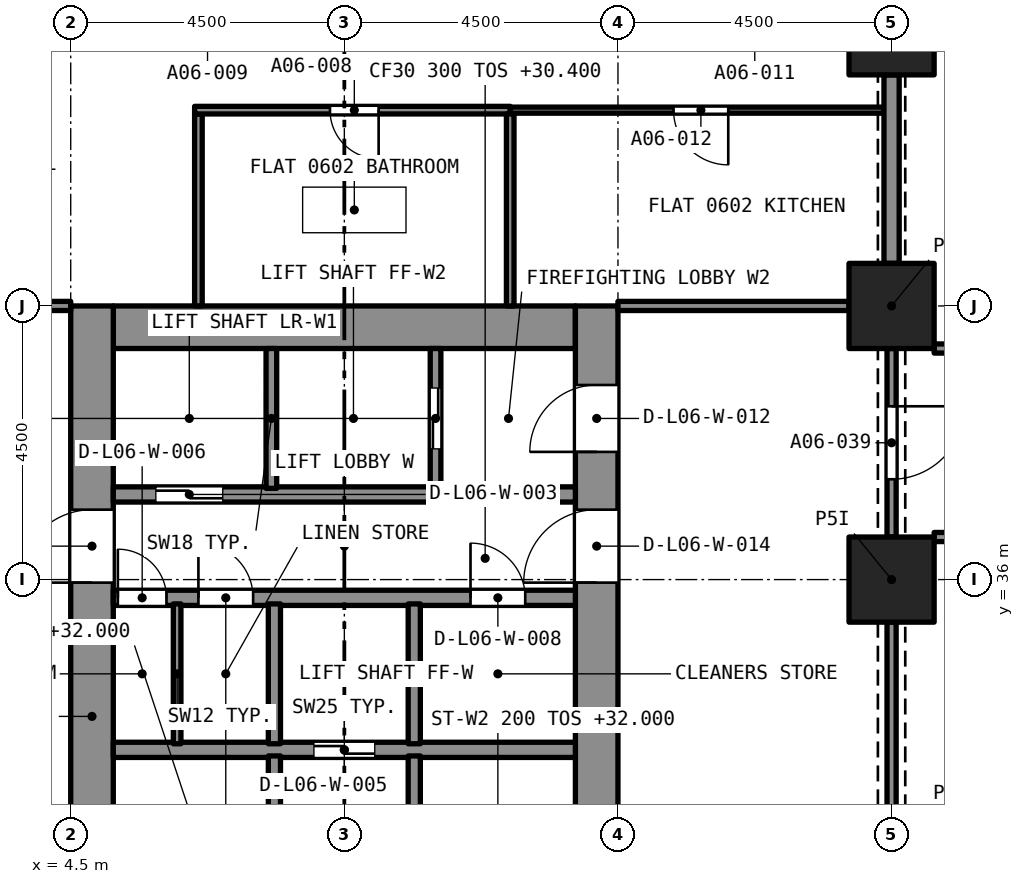
"""IFC4 building model, lengths in metres.
Left out: names, types, materials, properties, quantities, classifications, styles, units other than length and angle.
Written with IfcOpenShell. Run it as: python <this file> out.ifc"""

import sys

from ifc_helpers import new_model, si_unit, direction, frame, frame_2d, origin, origin_2d, place, context, subcontext, project, spatial, rectangle, extrude, element, fill, save


model = new_model("IFC4")
c1 = context("Model", 3, precision=1e-05, world=origin(), true_north=direction((0.0, 1.0)))
c2 = subcontext(c1, "Body", "Model", "MODEL_VIEW")
j1 = project(units=[si_unit("LENGTHUNIT", "METRE"), si_unit("PLANEANGLEUNIT", "RADIAN")], contexts=[c1])
p1 = place(None, origin())
s1 = spatial("IfcSite", under=j1, at=p1, CompositionType="ELEMENT")
p2 = place(p1, origin())
s2 = spatial("IfcBuilding", under=s1, at=p2, CompositionType="ELEMENT")
p3 = place(p2, frame((0.0, 0.0, 30.4)))
s3 = spatial("IfcBuildingStorey", under=s2, at=p3, CompositionType="ELEMENT", Elevation=30.4)
for number, where, z_axis, x_axis in (
    (1, (18.0, 36.0, 0.0), (0.0, 0.0, 1.0), (1.0, 0.0, 0.0)),
    (2, (18.0, 40.5, 0.0), (0.0, 0.0, 1.0), (1.0, 0.0, 0.0)),
    (3, (18.0, 45.0, 0.0), (0.0, 0.0, 1.0), (1.0, 0.0, 0.0)),
):
    element("IfcColumn", number, at=place(p3, frame(where, z_axis=z_axis, x_axis=x_axis)), inside=s3, PredefinedType="COLUMN", context=c2, shape_type="SweptSolid", body=[
        extrude(rectangle(XDim=1.4, YDim=1.4, at=origin_2d()), origin(), (0.0, 0.0, 1.0), 3.2),
    ])
p4 = place(p3, frame((5.2, 40.15, 0.0), z_axis=(0.0, 0.0, 1.0), x_axis=(1.0, 0.0, 0.0)))
e4 = element("IfcWall", 4, at=p4, inside=s3, PredefinedType="SOLIDWALL", context=c2, shape_type="SweptSolid", body=[
    extrude(rectangle(XDim=7.6, YDim=0.7, at=frame_2d((3.8, 0.0))), origin(), (0.0, 0.0, 1.0), 3.2),
])
p5 = place(p3, frame((4.85, 27.0, 0.0), z_axis=(0.0, 0.0, 1.0), x_axis=(0.0, 1.0, 0.0)))
e5 = element("IfcWall", 5, at=p5, inside=s3, PredefinedType="SOLIDWALL", context=c2, shape_type="SweptSolid", body=[
    extrude(rectangle(XDim=13.5, YDim=0.7, at=frame_2d((6.75, 0.0))), origin(), (0.0, 0.0, 1.0), 3.2),
])
p6 = place(p5, frame((8.95, 0.0, 0.0)))
e6 = element("IfcOpeningElement", 6, at=p6, cuts=e5, PredefinedType="OPENING", context=c2, shape_type="SweptSolid", body=[
    extrude(rectangle(XDim=1.2, YDim=2.1, at=frame_2d((0.6, 1.05))), frame((0.0, 0.36, 0.0), z_axis=(0.0, -1.0, 0.0), x_axis=(1.0, 0.0, 0.0)), (0.0, 0.0, 1.0), 0.72),
])
p7 = place(p3, frame((13.15, 27.0, 0.0), z_axis=(0.0, 0.0, 1.0), x_axis=(0.0, 1.0, 0.0)))
e7 = element("IfcWall", 7, at=p7, inside=s3, PredefinedType="SOLIDWALL", context=c2, shape_type="SweptSolid", body=[
    extrude(rectangle(XDim=13.5, YDim=0.7, at=frame_2d((6.75, 0.0))), origin(), (0.0, 0.0, 1.0), 3.2),
])
p8 = place(p7, frame((11.1, 0.0, 0.0)))
e8 = element("IfcOpeningElement", 8, at=p8, cuts=e7, PredefinedType="OPENING", context=c2, shape_type="SweptSolid", body=[
    extrude(rectangle(XDim=1.1, YDim=2.1, at=frame_2d((0.55, 1.05))), frame((0.0, 0.36, 0.0), z_axis=(0.0, -1.0, 0.0), x_axis=(1.0, 0.0, 0.0)), (0.0, 0.0, 1.0), 0.72),
])
p9 = place(p7, frame((8.95, 0.0, 0.0)))
e9 = element("IfcOpeningElement", 9, at=p9, cuts=e7, PredefinedType="OPENING", context=c2, shape_type="SweptSolid", body=[
    extrude(rectangle(XDim=1.2, YDim=2.1, at=frame_2d((0.6, 1.05))), frame((0.0, 0.36, 0.0), z_axis=(0.0, -1.0, 0.0), x_axis=(1.0, 0.0, 0.0)), (0.0, 0.0, 1.0), 0.72),
])
p10 = place(p3, frame((6.6, 40.5, 0.0), z_axis=(0.0, 0.0, 1.0), x_axis=(0.0, 1.0, 0.0)))
e10 = element("IfcWall", 10, at=p10, inside=s3, PredefinedType="PARTITIONING", context=c2, shape_type="SweptSolid", body=[
    extrude(rectangle(XDim=3.157, YDim=0.125, at=frame_2d((1.579, 0.0))), origin(), (0.0, 0.0, 1.0), 2.9),
])
p11 = place(p3, frame((11.728, 43.72, 0.0), z_axis=(0.0, 0.0, 1.0), x_axis=(-1.0, 0.0, 0.0)))
e11 = element("IfcWall", 11, at=p11, inside=s3, PredefinedType="PARTITIONING", context=c2, shape_type="SweptSolid", body=[
    extrude(rectangle(XDim=5.19, YDim=0.125, at=frame_2d((2.595, 0.0))), origin(), (0.0, 0.0, 1.0), 2.9),
])
p12 = place(p11, frame((2.164, 0.0, 0.0)))
e12 = element("IfcOpeningElement", 12, at=p12, cuts=e11, PredefinedType="OPENING", context=c2, shape_type="SweptSolid", body=[
    extrude(rectangle(XDim=0.8, YDim=2.1, at=frame_2d((0.4, 1.05))), frame((0.0, 0.073, 0.0), z_axis=(0.0, -1.0, 0.0), x_axis=(1.0, 0.0, 0.0)), (0.0, 0.0, 1.0), 0.145),
])
p13 = place(p3, frame((11.728, 40.5, 0.0), z_axis=(0.0, 0.0, 1.0), x_axis=(0.0, 1.0, 0.0)))
e13 = element("IfcWall", 13, at=p13, inside=s3, PredefinedType="PARTITIONING", context=c2, shape_type="SweptSolid", body=[
    extrude(rectangle(XDim=3.157, YDim=0.125, at=frame_2d((1.579, 0.0))), origin(), (0.0, 0.0, 1.0), 2.9),
])
p14 = place(p3, frame((17.875, 43.72, 0.0), z_axis=(0.0, 0.0, 1.0), x_axis=(-1.0, 0.0, 0.0)))
e14 = element("IfcWall", 14, at=p14, inside=s3, PredefinedType="PARTITIONING", context=c2, shape_type="SweptSolid", body=[
    extrude(rectangle(XDim=6.147, YDim=0.1, at=frame_2d((3.073, 0.0))), origin(), (0.0, 0.0, 1.0), 2.9),
])
p15 = place(p14, frame((2.561, 0.0, 0.0)))
e15 = element("IfcOpeningElement", 15, at=p15, cuts=e14, PredefinedType="OPENING", context=c2, shape_type="SweptSolid", body=[
    extrude(rectangle(XDim=0.9, YDim=2.1, at=frame_2d((0.45, 1.05))), frame((0.0, 0.06, 0.0), z_axis=(0.0, -1.0, 0.0), x_axis=(1.0, 0.0, 0.0)), (0.0, 0.0, 1.0), 0.12),
])
p16 = place(p3, frame((0.7, 40.5, 0.0), z_axis=(0.0, 0.0, 1.0), x_axis=(1.0, 0.0, 0.0)))
e16 = element("IfcWall", 16, at=p16, inside=s3, PredefinedType="PARTITIONING", context=c2, shape_type="SweptSolid", body=[
    extrude(rectangle(XDim=3.8, YDim=0.15, at=frame_2d((1.9, 0.0))), origin(), (0.0, 0.0, 1.0), 2.9),
])
p17 = place(p16, frame((1.05, 0.0, 0.0)))
e17 = element("IfcOpeningElement", 17, at=p17, cuts=e16, PredefinedType="OPENING", context=c2, shape_type="SweptSolid", body=[
    extrude(rectangle(XDim=1.0, YDim=2.1, at=frame_2d((0.5, 1.05))), frame((0.0, 0.085, 0.0), z_axis=(0.0, -1.0, 0.0), x_axis=(1.0, 0.0, 0.0)), (0.0, 0.0, 1.0), 0.17),
])
p18 = place(p3, frame((18.0, 41.2, 0.0), z_axis=(0.0, 0.0, 1.0), x_axis=(0.0, 1.0, 0.0)))
e18 = element("IfcWall", 18, at=p18, inside=s3, PredefinedType="PARTITIONING", context=c2, shape_type="SweptSolid", body=[
    extrude(rectangle(XDim=3.1, YDim=0.25, at=frame_2d((1.55, 0.0))), origin(), (0.0, 0.0, 1.0), 2.38),
])
p19 = place(p3, frame((13.5, 40.5, 0.0), z_axis=(0.0, 0.0, 1.0), x_axis=(1.0, 0.0, 0.0)))
e19 = element("IfcWall", 19, at=p19, inside=s3, PredefinedType="PARTITIONING", context=c2, shape_type="SweptSolid", body=[
    extrude(rectangle(XDim=3.8, YDim=0.15, at=frame_2d((1.9, 0.0))), origin(), (0.0, 0.0, 1.0), 2.9),
])
p20 = place(p3, frame((18.7, 39.8, 0.0), z_axis=(0.0, 0.0, 1.0), x_axis=(1.0, 0.0, 0.0)))
e20 = element("IfcWall", 20, at=p20, inside=s3, PredefinedType="PARTITIONING", context=c2, shape_type="SweptSolid", body=[
    extrude(rectangle(XDim=12.1, YDim=0.15, at=frame_2d((6.05, 0.0))), origin(), (0.0, 0.0, 1.0), 2.75),
])
p21 = place(p20, frame((5.55, 0.0, 0.0)))
e21 = element("IfcOpeningElement", 21, at=p21, cuts=e20, PredefinedType="OPENING", context=c2, shape_type="SweptSolid", body=[
    extrude(rectangle(XDim=1.0, YDim=2.1, at=frame_2d((0.5, 1.05))), frame((0.0, 0.085, 0.0), z_axis=(0.0, -1.0, 0.0), x_axis=(1.0, 0.0, 0.0)), (0.0, 0.0, 1.0), 0.17),
])
p22 = place(p3, frame((24.75, 36.7, 0.0), z_axis=(0.0, 0.0, 1.0), x_axis=(-1.0, 0.0, 0.0)))
e22 = element("IfcWall", 22, at=p22, inside=s3, PredefinedType="PARTITIONING", context=c2, shape_type="SweptSolid", body=[
    extrude(rectangle(XDim=6.05, YDim=0.15, at=frame_2d((3.025, 0.0))), origin(), (0.0, 0.0, 1.0), 2.75),
])
p23 = place(p22, frame((2.875, 0.0, 0.0)))
e23 = element("IfcOpeningElement", 23, at=p23, cuts=e22, PredefinedType="OPENING", context=c2, shape_type="SweptSolid", body=[
    extrude(rectangle(XDim=1.0, YDim=2.1, at=frame_2d((0.5, 1.05))), frame((0.0, 0.085, 0.0), z_axis=(0.0, -1.0, 0.0), x_axis=(1.0, 0.0, 0.0)), (0.0, 0.0, 1.0), 0.17),
])
p24 = place(p3, frame((18.0, 39.8, 0.0), z_axis=(0.0, 0.0, 1.0), x_axis=(0.0, -1.0, 0.0)))
e24 = element("IfcWall", 24, at=p24, inside=s3, PredefinedType="PARTITIONING", context=c2, shape_type="SweptSolid", body=[
    extrude(rectangle(XDim=3.1, YDim=0.15, at=frame_2d((1.55, 0.0))), origin(), (0.0, 0.0, 1.0), 2.38),
])
p25 = place(p24, frame((0.95, 0.0, 0.0)))
e25 = element("IfcOpeningElement", 25, at=p25, cuts=e24, PredefinedType="OPENING", context=c2, shape_type="SweptSolid", body=[
    extrude(rectangle(XDim=1.2, YDim=2.1, at=frame_2d((0.6, 1.05))), frame((0.0, 0.085, 0.0), z_axis=(0.0, -1.0, 0.0), x_axis=(1.0, 0.0, 0.0)), (0.0, 0.0, 1.0), 0.17),
])
p26 = place(p3, frame((18.0, 32.2, 0.0), z_axis=(0.0, 0.0, 1.0), x_axis=(0.0, 1.0, 0.0)))
e26 = element("IfcWall", 26, at=p26, inside=s3, PredefinedType="PARTITIONING", context=c2, shape_type="SweptSolid", body=[
    extrude(rectangle(XDim=3.1, YDim=0.15, at=frame_2d((1.55, 0.0))), origin(), (0.0, 0.0, 1.0), 2.38),
])
p27 = place(p3, frame((5.2, 33.2, 0.0), z_axis=(0.0, 0.0, 1.0), x_axis=(1.0, 0.0, 0.0)))
e27 = element("IfcWall", 27, at=p27, inside=s3, PredefinedType="SOLIDWALL", context=c2, shape_type="SweptSolid", body=[
    extrude(rectangle(XDim=7.6, YDim=0.25, at=frame_2d((3.8, 0.0))), origin(), (0.0, 0.0, 1.0), 2.9),
])
p28 = place(p27, frame((3.3, 0.0, 0.0)))
e28 = element("IfcOpeningElement", 28, at=p28, cuts=e27, PredefinedType="OPENING", context=c2, shape_type="SweptSolid", body=[
    extrude(rectangle(XDim=1.0, YDim=2.1, at=frame_2d((0.5, 1.05))), frame((0.0, 0.135, 0.0), z_axis=(0.0, -1.0, 0.0), x_axis=(1.0, 0.0, 0.0)), (0.0, 0.0, 1.0), 0.27),
])
p29 = place(p3, frame((5.2, 35.7, 0.0), z_axis=(0.0, 0.0, 1.0), x_axis=(1.0, 0.0, 0.0)))
e29 = element("IfcWall", 29, at=p29, inside=s3, PredefinedType="SOLIDWALL", context=c2, shape_type="SweptSolid", body=[
    extrude(rectangle(XDim=7.6, YDim=0.25, at=frame_2d((3.8, 0.0))), origin(), (0.0, 0.0, 1.0), 2.9),
])
p30 = place(p29, frame((0.075, 0.0, 0.0)))
e30 = element("IfcOpeningElement", 30, at=p30, cuts=e29, PredefinedType="OPENING", context=c2, shape_type="SweptSolid", body=[
    extrude(rectangle(XDim=0.8, YDim=2.1, at=frame_2d((0.4, 1.05))), frame((0.0, 0.135, 0.0), z_axis=(0.0, -1.0, 0.0), x_axis=(1.0, 0.0, 0.0)), (0.0, 0.0, 1.0), 0.27),
])
p31 = place(p29, frame((1.4, 0.0, 0.0)))
e31 = element("IfcOpeningElement", 31, at=p31, cuts=e29, PredefinedType="OPENING", context=c2, shape_type="SweptSolid", body=[
    extrude(rectangle(XDim=0.9, YDim=2.1, at=frame_2d((0.45, 1.05))), frame((0.0, 0.135, 0.0), z_axis=(0.0, -1.0, 0.0), x_axis=(1.0, 0.0, 0.0)), (0.0, 0.0, 1.0), 0.27),
])
p32 = place(p29, frame((5.875, 0.0, 0.0)))
e32 = element("IfcOpeningElement", 32, at=p32, cuts=e29, PredefinedType="OPENING", context=c2, shape_type="SweptSolid", body=[
    extrude(rectangle(XDim=0.9, YDim=2.1, at=frame_2d((0.45, 1.05))), frame((0.0, 0.135, 0.0), z_axis=(0.0, -1.0, 0.0), x_axis=(1.0, 0.0, 0.0)), (0.0, 0.0, 1.0), 0.27),
])
p33 = place(p3, frame((5.2, 37.4, 0.0), z_axis=(0.0, 0.0, 1.0), x_axis=(1.0, 0.0, 0.0)))
e33 = element("IfcWall", 33, at=p33, inside=s3, PredefinedType="SOLIDWALL", context=c2, shape_type="SweptSolid", body=[
    extrude(rectangle(XDim=7.6, YDim=0.25, at=frame_2d((3.8, 0.0))), origin(), (0.0, 0.0, 1.0), 2.9),
])
p34 = place(p33, frame((0.7, 0.0, 0.0)))
e34 = element("IfcOpeningElement", 34, at=p34, cuts=e33, PredefinedType="OPENING", context=c2, shape_type="SweptSolid", body=[
    extrude(rectangle(XDim=1.1, YDim=2.4, at=frame_2d((0.55, 1.2))), frame((0.0, 0.135, 0.0), z_axis=(0.0, -1.0, 0.0), x_axis=(1.0, 0.0, 0.0)), (0.0, 0.0, 1.0), 0.27),
])
p35 = place(p3, frame((7.85, 27.7, 0.0), z_axis=(0.0, 0.0, 1.0), x_axis=(0.0, 1.0, 0.0)))
e35 = element("IfcWall", 35, at=p35, inside=s3, PredefinedType="SOLIDWALL", context=c2, shape_type="SweptSolid", body=[
    extrude(rectangle(XDim=5.4, YDim=0.2, at=frame_2d((2.7, 0.0))), origin(), (0.0, 0.0, 1.0), 2.9),
])
p36 = place(p35, frame((0.2, 0.0, 0.0)))
e36 = element("IfcOpeningElement", 36, at=p36, cuts=e35, PredefinedType="OPENING", context=c2, shape_type="SweptSolid", body=[
    extrude(rectangle(XDim=0.9, YDim=2.1, at=frame_2d((0.45, 1.05))), frame((0.0, 0.11, 0.0), z_axis=(0.0, -1.0, 0.0), x_axis=(1.0, 0.0, 0.0)), (0.0, 0.0, 1.0), 0.22),
])
p37 = place(p3, frame((10.15, 27.7, 0.0), z_axis=(0.0, 0.0, 1.0), x_axis=(0.0, 1.0, 0.0)))
e37 = element("IfcWall", 37, at=p37, inside=s3, PredefinedType="SOLIDWALL", context=c2, shape_type="SweptSolid", body=[
    extrude(rectangle(XDim=5.4, YDim=0.2, at=frame_2d((2.7, 0.0))), origin(), (0.0, 0.0, 1.0), 2.9),
])
p38 = place(p37, frame((0.2, 0.0, 0.0)))
e38 = element("IfcOpeningElement", 38, at=p38, cuts=e37, PredefinedType="OPENING", context=c2, shape_type="SweptSolid", body=[
    extrude(rectangle(XDim=0.9, YDim=2.1, at=frame_2d((0.45, 1.05))), frame((0.0, 0.11, 0.0), z_axis=(0.0, -1.0, 0.0), x_axis=(1.0, 0.0, 0.0)), (0.0, 0.0, 1.0), 0.22),
])
for number, where, z_axis, x_axis in (
    (39, (7.85, 33.3, 0.0), (0.0, 0.0, 1.0), (0.0, 1.0, 0.0)),
    (40, (10.15, 33.3, 0.0), (0.0, 0.0, 1.0), (0.0, 1.0, 0.0)),
):
    element("IfcWall", number, at=place(p3, frame(where, z_axis=z_axis, x_axis=x_axis)), inside=s3, PredefinedType="SOLIDWALL", context=c2, shape_type="SweptSolid", body=[
        extrude(rectangle(XDim=2.3, YDim=0.2, at=frame_2d((1.15, 0.0))), origin(), (0.0, 0.0, 1.0), 2.9),
    ])
p39 = place(p3, frame((7.8, 37.5, 0.0), z_axis=(0.0, 0.0, 1.0), x_axis=(0.0, 1.0, 0.0)))
e41 = element("IfcWall", 41, at=p39, inside=s3, PredefinedType="SOLIDWALL", context=c2, shape_type="SweptSolid", body=[
    extrude(rectangle(XDim=2.3, YDim=0.175, at=frame_2d((1.15, 0.0))), origin(), (0.0, 0.0, 1.0), 2.9),
])
p40 = place(p3, frame((10.5, 37.5, 0.0), z_axis=(0.0, 0.0, 1.0), x_axis=(0.0, 1.0, 0.0)))
e42 = element("IfcWall", 42, at=p40, inside=s3, PredefinedType="SOLIDWALL", context=c2, shape_type="SweptSolid", body=[
    extrude(rectangle(XDim=2.3, YDim=0.175, at=frame_2d((1.15, 0.0))), origin(), (0.0, 0.0, 1.0), 2.9),
])
p41 = place(p40, frame((0.65, 0.0, 0.0)))
e43 = element("IfcOpeningElement", 43, at=p41, cuts=e42, PredefinedType="OPENING", context=c2, shape_type="SweptSolid", body=[
    extrude(rectangle(XDim=1.0, YDim=2.1, at=frame_2d((0.5, 1.05))), frame((0.0, 0.097, 0.0), z_axis=(0.0, -1.0, 0.0), x_axis=(1.0, 0.0, 0.0)), (0.0, 0.0, 1.0), 0.195),
])
p42 = place(p3, frame((6.25, 33.3, 0.0), z_axis=(0.0, 0.0, 1.0), x_axis=(0.0, 1.0, 0.0)))
e44 = element("IfcWall", 44, at=p42, inside=s3, PredefinedType="PARTITIONING", context=c2, shape_type="SweptSolid", body=[
    extrude(rectangle(XDim=2.3, YDim=0.125, at=frame_2d((1.15, 0.0))), origin(), (0.0, 0.0, 1.0), 2.9),
])
p43 = place(p12, origin())
e45 = element("IfcDoor", 45, at=p43, inside=s3, OperationType="SINGLE_SWING_LEFT", PredefinedType="DOOR", context=c2, shape_type="SweptSolid", body=[
    extrude(rectangle(XDim=0.8, YDim=2.1, at=frame_2d((0.4, 1.05))), frame((0.0, 0.025, 0.0), z_axis=(0.0, -1.0, 0.0), x_axis=(1.0, 0.0, 0.0)), (0.0, 0.0, 1.0), 0.05),
])
fill(e12, e45)
p44 = place(p15, origin())
e46 = element("IfcDoor", 46, at=p44, inside=s3, OperationType="SINGLE_SWING_LEFT", PredefinedType="DOOR", context=c2, shape_type="SweptSolid", body=[
    extrude(rectangle(XDim=0.9, YDim=2.1, at=frame_2d((0.45, 1.05))), frame((0.0, 0.025, 0.0), z_axis=(0.0, -1.0, 0.0), x_axis=(1.0, 0.0, 0.0)), (0.0, 0.0, 1.0), 0.05),
])
fill(e15, e46)
p45 = place(p25, origin())
e47 = element("IfcDoor", 47, at=p45, inside=s3, OperationType="SINGLE_SWING_LEFT", PredefinedType="DOOR", context=c2, shape_type="SweptSolid", body=[
    extrude(rectangle(XDim=1.2, YDim=2.1, at=frame_2d((0.6, 1.05))), frame((0.0, 0.025, 0.0), z_axis=(0.0, -1.0, 0.0), x_axis=(1.0, 0.0, 0.0)), (0.0, 0.0, 1.0), 0.05),
])
fill(e25, e47)
p46 = place(p34, origin())
e48 = element("IfcDoor", 48, at=p46, inside=s3, OperationType="SLIDING_TO_LEFT", PredefinedType="DOOR", context=c2, shape_type="SweptSolid", body=[
    extrude(rectangle(XDim=1.1, YDim=2.4, at=frame_2d((0.55, 1.2))), frame((0.0, 0.025, 0.0), z_axis=(0.0, -1.0, 0.0), x_axis=(1.0, 0.0, 0.0)), (0.0, 0.0, 1.0), 0.05),
])
fill(e34, e48)
p47 = place(p41, origin())
e49 = element("IfcDoor", 49, at=p47, inside=s3, OperationType="SLIDING_TO_LEFT", PredefinedType="DOOR", context=c2, shape_type="SweptSolid", body=[
    extrude(rectangle(XDim=1.0, YDim=2.1, at=frame_2d((0.5, 1.05))), frame((0.0, 0.025, 0.0), z_axis=(0.0, -1.0, 0.0), x_axis=(1.0, 0.0, 0.0)), (0.0, 0.0, 1.0), 0.05),
])
fill(e43, e49)
p48 = place(p28, origin())
e50 = element("IfcDoor", 50, at=p48, inside=s3, OperationType="SLIDING_TO_LEFT", PredefinedType="DOOR", context=c2, shape_type="SweptSolid", body=[
    extrude(rectangle(XDim=1.0, YDim=2.1, at=frame_2d((0.5, 1.05))), frame((0.0, 0.025, 0.0), z_axis=(0.0, -1.0, 0.0), x_axis=(1.0, 0.0, 0.0)), (0.0, 0.0, 1.0), 0.05),
])
fill(e28, e50)
p49 = place(p30, origin())
e51 = element("IfcDoor", 51, at=p49, inside=s3, OperationType="SINGLE_SWING_LEFT", PredefinedType="DOOR", context=c2, shape_type="SweptSolid", body=[
    extrude(rectangle(XDim=0.8, YDim=2.1, at=frame_2d((0.4, 1.05))), frame((0.0, 0.025, 0.0), z_axis=(0.0, -1.0, 0.0), x_axis=(1.0, 0.0, 0.0)), (0.0, 0.0, 1.0), 0.05),
])
fill(e30, e51)
p50 = place(p31, origin())
e52 = element("IfcDoor", 52, at=p50, inside=s3, OperationType="SINGLE_SWING_LEFT", PredefinedType="DOOR", context=c2, shape_type="SweptSolid", body=[
    extrude(rectangle(XDim=0.9, YDim=2.1, at=frame_2d((0.45, 1.05))), frame((0.0, 0.025, 0.0), z_axis=(0.0, -1.0, 0.0), x_axis=(1.0, 0.0, 0.0)), (0.0, 0.0, 1.0), 0.05),
])
fill(e31, e52)
p51 = place(p32, origin())
e53 = element("IfcDoor", 53, at=p51, inside=s3, OperationType="SINGLE_SWING_LEFT", PredefinedType="DOOR", context=c2, shape_type="SweptSolid", body=[
    extrude(rectangle(XDim=0.9, YDim=2.1, at=frame_2d((0.45, 1.05))), frame((0.0, 0.025, 0.0), z_axis=(0.0, -1.0, 0.0), x_axis=(1.0, 0.0, 0.0)), (0.0, 0.0, 1.0), 0.05),
])
fill(e32, e53)
p52 = place(p8, origin())
e54 = element("IfcDoor", 54, at=p52, inside=s3, OperationType="SINGLE_SWING_LEFT", PredefinedType="DOOR", context=c2, shape_type="SweptSolid", body=[
    extrude(rectangle(XDim=1.1, YDim=2.1, at=frame_2d((0.55, 1.05))), frame((0.0, 0.025, 0.0), z_axis=(0.0, -1.0, 0.0), x_axis=(1.0, 0.0, 0.0)), (0.0, 0.0, 1.0), 0.05),
])
fill(e8, e54)
p53 = place(p6, origin())
e55 = element("IfcDoor", 55, at=p53, inside=s3, OperationType="SINGLE_SWING_LEFT", PredefinedType="DOOR", context=c2, shape_type="SweptSolid", body=[
    extrude(rectangle(XDim=1.2, YDim=2.1, at=frame_2d((0.6, 1.05))), frame((0.0, 0.025, 0.0), z_axis=(0.0, -1.0, 0.0), x_axis=(1.0, 0.0, 0.0)), (0.0, 0.0, 1.0), 0.05),
])
fill(e6, e55)
p54 = place(p9, origin())
e56 = element("IfcDoor", 56, at=p54, inside=s3, OperationType="SINGLE_SWING_LEFT", PredefinedType="DOOR", context=c2, shape_type="SweptSolid", body=[
    extrude(rectangle(XDim=1.2, YDim=2.1, at=frame_2d((0.6, 1.05))), frame((0.0, 0.025, 0.0), z_axis=(0.0, -1.0, 0.0), x_axis=(1.0, 0.0, 0.0)), (0.0, 0.0, 1.0), 0.05),
])
fill(e9, e56)
save(model, sys.argv[1])
